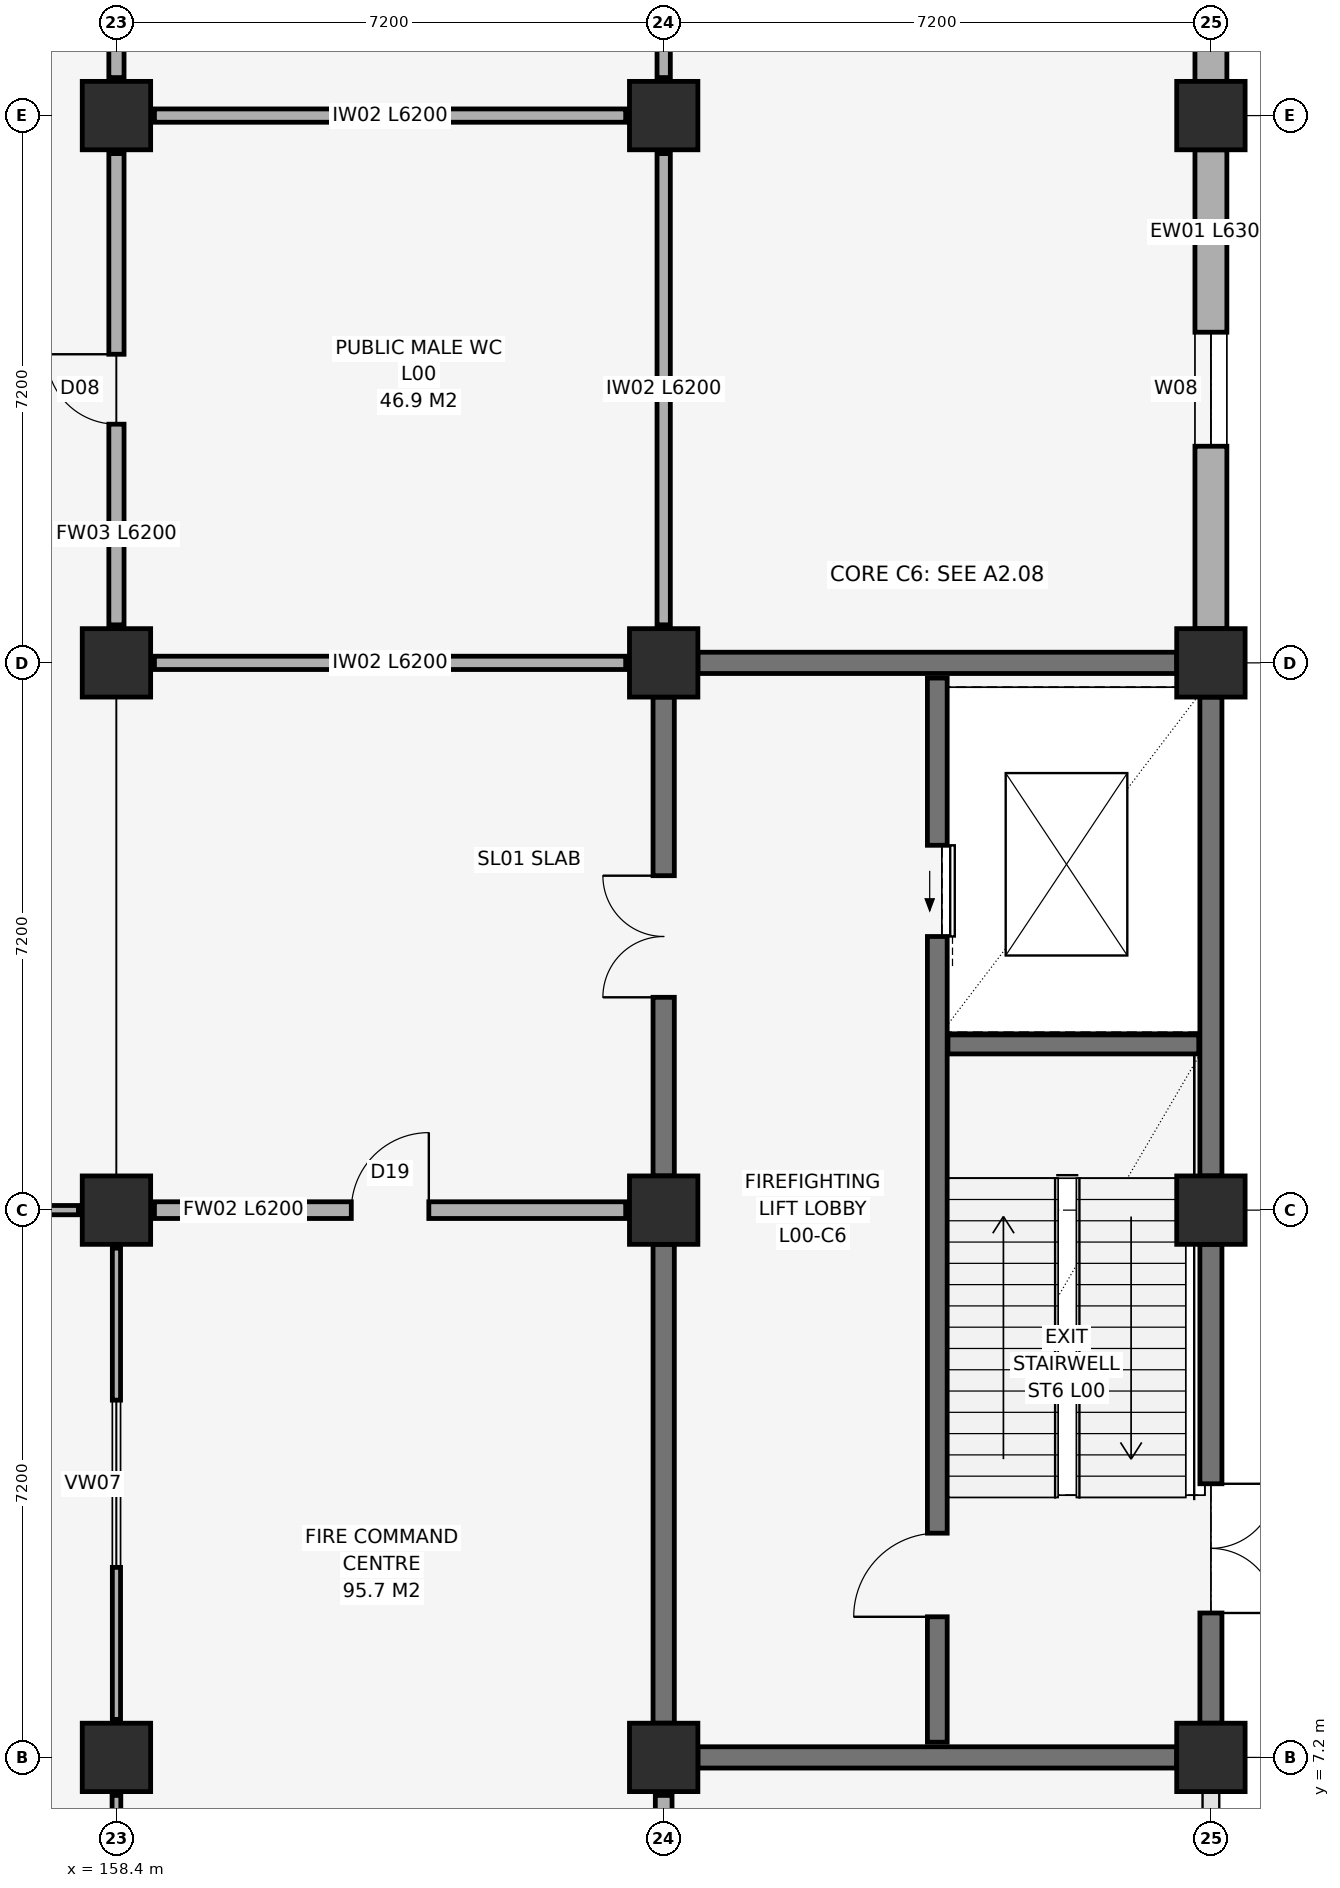
"""IFC4 building model, lengths in metres.
Left out: names, types, materials, properties, quantities, classifications, styles, units other than length and angle.
Written with IfcOpenShell. Run it as: python <this file> out.ifc"""

import sys

from ifc_helpers import new_model, si_unit, direction, frame, frame_2d, origin, origin_2d, place, context, subcontext, project, spatial, rectangle, extrude, element, fill, save


model = new_model("IFC4")
c1 = context("Model", 3, precision=1e-05, world=origin(), true_north=direction((0.0, 1.0)))
c2 = subcontext(c1, "Body", "Model", "MODEL_VIEW")
j1 = project(units=[si_unit("LENGTHUNIT", "METRE"), si_unit("PLANEANGLEUNIT", "RADIAN")], contexts=[c1])
p1 = place(None, origin())
s1 = spatial("IfcSite", under=j1, at=p1, CompositionType="ELEMENT")
p2 = place(p1, origin())
s2 = spatial("IfcBuilding", under=s1, at=p2, CompositionType="ELEMENT")
p3 = place(p2, origin())
s3 = spatial("IfcBuildingStorey", under=s2, at=p3, CompositionType="ELEMENT", Elevation=0.0)
for number, where, z_axis, x_axis in (
    (1, (158.4, 7.2, 0.0), (0.0, 0.0, 1.0), (1.0, 0.0, 0.0)),
    (2, (158.4, 14.4, 0.0), (0.0, 0.0, 1.0), (1.0, 0.0, 0.0)),
    (3, (158.4, 21.6, 0.0), (0.0, 0.0, 1.0), (1.0, 0.0, 0.0)),
    (4, (158.4, 28.8, 0.0), (0.0, 0.0, 1.0), (1.0, 0.0, 0.0)),
    (5, (165.6, 7.2, 0.0), (0.0, 0.0, 1.0), (1.0, 0.0, 0.0)),
    (6, (165.6, 14.4, 0.0), (0.0, 0.0, 1.0), (1.0, 0.0, 0.0)),
    (7, (165.6, 21.6, 0.0), (0.0, 0.0, 1.0), (1.0, 0.0, 0.0)),
    (8, (165.6, 28.8, 0.0), (0.0, 0.0, 1.0), (1.0, 0.0, 0.0)),
    (9, (172.8, 7.2, 0.0), (0.0, 0.0, 1.0), (1.0, 0.0, 0.0)),
    (10, (172.8, 14.4, 0.0), (0.0, 0.0, 1.0), (1.0, 0.0, 0.0)),
    (11, (172.8, 21.6, 0.0), (0.0, 0.0, 1.0), (1.0, 0.0, 0.0)),
    (12, (172.8, 28.8, 0.0), (0.0, 0.0, 1.0), (1.0, 0.0, 0.0)),
):
    element("IfcColumn", number, at=place(p3, frame(where, z_axis=z_axis, x_axis=x_axis)), inside=s3, PredefinedType="COLUMN", context=c2, shape_type="SweptSolid", body=[
        extrude(rectangle(XDim=0.9, YDim=0.9, at=origin_2d()), origin(), (0.0, 0.0, 1.0), 5.4),
    ])
p4 = place(p3, frame((172.8, 22.05, 0.0), z_axis=(0.0, 0.0, 1.0), x_axis=(0.0, 1.0, 0.0)))
e13 = element("IfcWall", 13, at=p4, inside=s3, PredefinedType="SOLIDWALL", context=c2, shape_type="SweptSolid", body=[
    extrude(rectangle(XDim=6.3, YDim=0.42, at=frame_2d((3.15, 0.0))), origin(), (0.0, 0.0, 1.0), 4.44),
])
p5 = place(p4, frame((2.4, 0.0, 0.95)))
e14 = element("IfcOpeningElement", 14, at=p5, cuts=e13, PredefinedType="OPENING", context=c2, shape_type="SweptSolid", body=[
    extrude(rectangle(XDim=1.5, YDim=2.0, at=frame_2d((0.75, 1.0))), frame((0.0, 0.225, 0.0), z_axis=(0.0, -1.0, 0.0), x_axis=(1.0, 0.0, 0.0)), (0.0, 0.0, 1.0), 0.45),
])
p6 = place(p3, frame((172.8, 29.25, 0.0), z_axis=(0.0, 0.0, 1.0), x_axis=(0.0, 1.0, 0.0)))
e15 = element("IfcWall", 15, at=p6, inside=s3, PredefinedType="SOLIDWALL", context=c2, shape_type="SweptSolid", body=[
    extrude(rectangle(XDim=6.3, YDim=0.42, at=frame_2d((3.15, 0.0))), origin(), (0.0, 0.0, 1.0), 4.44),
])
p7 = place(p6, frame((2.4, 0.0, 0.95)))
e16 = element("IfcOpeningElement", 16, at=p7, cuts=e15, PredefinedType="OPENING", context=c2, shape_type="SweptSolid", body=[
    extrude(rectangle(XDim=1.5, YDim=1.75, at=frame_2d((0.75, 0.875))), frame((0.0, 0.225, 0.0), z_axis=(0.0, -1.0, 0.0), x_axis=(1.0, 0.0, 0.0)), (0.0, 0.0, 1.0), 0.45),
])
for number, where, z_axis, x_axis in (
    (17, (166.05, 7.2, 0.0), (0.0, 0.0, 1.0), (1.0, 0.0, 0.0)),
    (18, (166.05, 21.6, 0.0), (0.0, 0.0, 1.0), (1.0, 0.0, 0.0)),
    (19, (165.6, 7.65, 0.0), (0.0, 0.0, 1.0), (0.0, 1.0, 0.0)),
):
    element("IfcWall", number, at=place(p3, frame(where, z_axis=z_axis, x_axis=x_axis)), inside=s3, PredefinedType="SHEAR", context=c2, shape_type="SweptSolid", body=[
        extrude(rectangle(XDim=6.3, YDim=0.28, at=frame_2d((3.15, 0.0))), origin(), (0.0, 0.0, 1.0), 5.14),
    ])
p8 = place(p3, frame((165.6, 14.85, 0.0), z_axis=(0.0, 0.0, 1.0), x_axis=(0.0, 1.0, 0.0)))
e20 = element("IfcWall", 20, at=p8, inside=s3, PredefinedType="SHEAR", context=c2, shape_type="SweptSolid", body=[
    extrude(rectangle(XDim=6.3, YDim=0.28, at=frame_2d((3.15, 0.0))), origin(), (0.0, 0.0, 1.0), 5.14),
])
p9 = place(p8, frame((2.35, 0.0, 0.0)))
e21 = element("IfcOpeningElement", 21, at=p9, cuts=e20, PredefinedType="OPENING", context=c2, shape_type="SweptSolid", body=[
    extrude(rectangle(XDim=1.6, YDim=2.2, at=frame_2d((0.8, 1.1))), frame((0.0, 0.155, 0.0), z_axis=(0.0, -1.0, 0.0), x_axis=(1.0, 0.0, 0.0)), (0.0, 0.0, 1.0), 0.31),
])
p10 = place(p3, frame((172.8, 7.65, 0.0), z_axis=(0.0, 0.0, 1.0), x_axis=(0.0, 1.0, 0.0)))
e22 = element("IfcWall", 22, at=p10, inside=s3, PredefinedType="SHEAR", context=c2, shape_type="SweptSolid", body=[
    extrude(rectangle(XDim=6.3, YDim=0.29, at=frame_2d((3.15, 0.0))), origin(), (0.0, 0.0, 1.0), 5.14),
])
p11 = place(p10, frame((1.45, 0.0, 0.0)))
e23 = element("IfcOpeningElement", 23, at=p11, cuts=e22, PredefinedType="OPENING", context=c2, shape_type="SweptSolid", body=[
    extrude(rectangle(XDim=1.7, YDim=2.3, at=frame_2d((0.85, 1.15))), frame((0.0, 0.16, 0.0), z_axis=(0.0, -1.0, 0.0), x_axis=(1.0, 0.0, 0.0)), (0.0, 0.0, 1.0), 0.32),
])
p12 = place(p3, frame((172.8, 14.85, 0.0), z_axis=(0.0, 0.0, 1.0), x_axis=(0.0, 1.0, 0.0)))
e24 = element("IfcWall", 24, at=p12, inside=s3, PredefinedType="SHEAR", context=c2, shape_type="SweptSolid", body=[
    extrude(rectangle(XDim=6.3, YDim=0.29, at=frame_2d((3.15, 0.0))), origin(), (0.0, 0.0, 1.0), 5.14),
])
p13 = place(p3, frame((169.2, 7.4, 0.0), z_axis=(0.0, 0.0, 1.0), x_axis=(0.0, 1.0, 0.0)))
e25 = element("IfcWall", 25, at=p13, inside=s3, PredefinedType="SHEAR", context=c2, shape_type="SweptSolid", body=[
    extrude(rectangle(XDim=14.0, YDim=0.26, at=frame_2d((7.0, 0.0))), origin(), (0.0, 0.0, 1.0), 5.14),
])
p14 = place(p13, frame((1.65, 0.0, 0.0)))
e26 = element("IfcOpeningElement", 26, at=p14, cuts=e25, PredefinedType="OPENING", context=c2, shape_type="SweptSolid", body=[
    extrude(rectangle(XDim=1.1, YDim=2.15, at=frame_2d((0.55, 1.075))), frame((0.0, 0.145, 0.0), z_axis=(0.0, -1.0, 0.0), x_axis=(1.0, 0.0, 0.0)), (0.0, 0.0, 1.0), 0.29),
])
p15 = place(p13, frame((10.6, 0.0, 0.0)))
e27 = element("IfcOpeningElement", 27, at=p15, cuts=e25, PredefinedType="OPENING", context=c2, shape_type="SweptSolid", body=[
    extrude(rectangle(XDim=1.2, YDim=2.25, at=frame_2d((0.6, 1.125))), frame((0.0, 0.145, 0.0), z_axis=(0.0, -1.0, 0.0), x_axis=(1.0, 0.0, 0.0)), (0.0, 0.0, 1.0), 0.29),
])
p16 = place(p3, frame((169.34, 16.58, 0.0), z_axis=(0.0, 0.0, 1.0), x_axis=(1.0, 0.0, 0.0)))
e28 = element("IfcWall", 28, at=p16, inside=s3, PredefinedType="SHEAR", context=c2, shape_type="SweptSolid", body=[
    extrude(rectangle(XDim=3.3, YDim=0.25, at=frame_2d((1.65, 0.0))), origin(), (0.0, 0.0, 1.0), 5.14),
])
p17 = place(p3, frame((151.7, 14.4, 0.0), z_axis=(0.0, 0.0, 1.0), x_axis=(1.0, 0.0, 0.0)))
e29 = element("IfcWall", 29, at=p17, inside=s3, PredefinedType="PARTITIONING", context=c2, shape_type="SweptSolid", body=[
    extrude(rectangle(XDim=6.2, YDim=0.122, at=frame_2d((3.1, 0.0))), origin(), (0.0, 0.0, 1.0), 4.29),
])
p18 = place(p17, frame((1.85, 0.0, 0.95)))
e30 = element("IfcOpeningElement", 30, at=p18, cuts=e29, PredefinedType="OPENING", context=c2, shape_type="SweptSolid", body=[
    extrude(rectangle(XDim=2.5, YDim=1.35, at=frame_2d((1.25, 0.675))), frame((0.0, 0.076, 0.0), z_axis=(0.0, -1.0, 0.0), x_axis=(1.0, 0.0, 0.0)), (0.0, 0.0, 1.0), 0.152),
])
p19 = place(p3, frame((158.4, 0.5, 0.0), z_axis=(0.0, 0.0, 1.0), x_axis=(0.0, 1.0, 0.0)))
e31 = element("IfcWall", 31, at=p19, inside=s3, PredefinedType="PARTITIONING", context=c2, shape_type="SweptSolid", body=[
    extrude(rectangle(XDim=6.2, YDim=0.115, at=frame_2d((3.1, 0.0))), origin(), (0.0, 0.0, 1.0), 4.49),
])
p20 = place(p3, frame((158.4, 7.7, 0.0), z_axis=(0.0, 0.0, 1.0), x_axis=(0.0, 1.0, 0.0)))
e32 = element("IfcWall", 32, at=p20, inside=s3, PredefinedType="PARTITIONING", context=c2, shape_type="SweptSolid", body=[
    extrude(rectangle(XDim=6.2, YDim=0.108, at=frame_2d((3.1, 0.0))), origin(), (0.0, 0.0, 1.0), 4.49),
])
p21 = place(p20, frame((2.0, 0.0, 0.95)))
e33 = element("IfcOpeningElement", 33, at=p21, cuts=e32, PredefinedType="OPENING", context=c2, shape_type="SweptSolid", body=[
    extrude(rectangle(XDim=2.2, YDim=1.35, at=frame_2d((1.1, 0.675))), frame((0.0, 0.069, 0.0), z_axis=(0.0, -1.0, 0.0), x_axis=(1.0, 0.0, 0.0)), (0.0, 0.0, 1.0), 0.138),
])
p22 = place(p3, frame((158.9, 14.4, 0.0), z_axis=(0.0, 0.0, 1.0), x_axis=(1.0, 0.0, 0.0)))
e34 = element("IfcWall", 34, at=p22, inside=s3, PredefinedType="SOLIDWALL", context=c2, shape_type="SweptSolid", body=[
    extrude(rectangle(XDim=6.2, YDim=0.22, at=frame_2d((3.1, 0.0))), origin(), (0.0, 0.0, 1.0), 4.29),
])
p23 = place(p22, frame((2.59, 0.0, 0.0)))
e35 = element("IfcOpeningElement", 35, at=p23, cuts=e34, PredefinedType="OPENING", context=c2, shape_type="SweptSolid", body=[
    extrude(rectangle(XDim=1.02, YDim=2.15, at=frame_2d((0.51, 1.075))), frame((0.0, 0.125, 0.0), z_axis=(0.0, -1.0, 0.0), x_axis=(1.0, 0.0, 0.0)), (0.0, 0.0, 1.0), 0.25),
])
p24 = place(p3, frame((165.6, 0.5, 0.0), z_axis=(0.0, 0.0, 1.0), x_axis=(0.0, 1.0, 0.0)))
e36 = element("IfcWall", 36, at=p24, inside=s3, PredefinedType="SOLIDWALL", context=c2, shape_type="SweptSolid", body=[
    extrude(rectangle(XDim=6.2, YDim=0.22, at=frame_2d((3.1, 0.0))), origin(), (0.0, 0.0, 1.0), 4.49),
])
for number, where, z_axis, x_axis in (
    (37, (158.9, 21.6, 0.0), (0.0, 0.0, 1.0), (1.0, 0.0, 0.0)),
    (38, (158.9, 28.8, 0.0), (0.0, 0.0, 1.0), (1.0, 0.0, 0.0)),
):
    element("IfcWall", number, at=place(p3, frame(where, z_axis=z_axis, x_axis=x_axis)), inside=s3, PredefinedType="PARTITIONING", context=c2, shape_type="SweptSolid", body=[
        extrude(rectangle(XDim=6.2, YDim=0.175, at=frame_2d((3.1, 0.0))), origin(), (0.0, 0.0, 1.0), 4.29),
    ])
p25 = place(p3, frame((158.4, 22.1, 0.0), z_axis=(0.0, 0.0, 1.0), x_axis=(0.0, 1.0, 0.0)))
e39 = element("IfcWall", 39, at=p25, inside=s3, PredefinedType="SOLIDWALL", context=c2, shape_type="SweptSolid", body=[
    extrude(rectangle(XDim=6.2, YDim=0.2, at=frame_2d((3.1, 0.0))), origin(), (0.0, 0.0, 1.0), 4.49),
])
p26 = place(p25, frame((2.64, 0.0, 0.0)))
e40 = element("IfcOpeningElement", 40, at=p26, cuts=e39, PredefinedType="OPENING", context=c2, shape_type="SweptSolid", body=[
    extrude(rectangle(XDim=0.92, YDim=2.1, at=frame_2d((0.46, 1.05))), frame((0.0, 0.115, 0.0), z_axis=(0.0, -1.0, 0.0), x_axis=(1.0, 0.0, 0.0)), (0.0, 0.0, 1.0), 0.23),
])
p27 = place(p3, frame((165.6, 22.1, 0.0), z_axis=(0.0, 0.0, 1.0), x_axis=(0.0, 1.0, 0.0)))
e41 = element("IfcWall", 41, at=p27, inside=s3, PredefinedType="PARTITIONING", context=c2, shape_type="SweptSolid", body=[
    extrude(rectangle(XDim=6.2, YDim=0.175, at=frame_2d((3.1, 0.0))), origin(), (0.0, 0.0, 1.0), 4.49),
])
p28 = place(p3, frame((158.4, 29.3, 0.0), z_axis=(0.0, 0.0, 1.0), x_axis=(0.0, 1.0, 0.0)))
e42 = element("IfcWall", 42, at=p28, inside=s3, PredefinedType="SOLIDWALL", context=c2, shape_type="SweptSolid", body=[
    extrude(rectangle(XDim=6.2, YDim=0.2, at=frame_2d((3.1, 0.0))), origin(), (0.0, 0.0, 1.0), 4.49),
])
p29 = place(p28, frame((2.625, 0.0, 0.0)))
e43 = element("IfcOpeningElement", 43, at=p29, cuts=e42, PredefinedType="OPENING", context=c2, shape_type="SweptSolid", body=[
    extrude(rectangle(XDim=0.95, YDim=2.1, at=frame_2d((0.475, 1.05))), frame((0.0, 0.115, 0.0), z_axis=(0.0, -1.0, 0.0), x_axis=(1.0, 0.0, 0.0)), (0.0, 0.0, 1.0), 0.23),
])
p30 = place(p3, frame((165.6, 29.3, 0.0), z_axis=(0.0, 0.0, 1.0), x_axis=(0.0, 1.0, 0.0)))
e44 = element("IfcWall", 44, at=p30, inside=s3, PredefinedType="PARTITIONING", context=c2, shape_type="SweptSolid", body=[
    extrude(rectangle(XDim=6.2, YDim=0.175, at=frame_2d((3.1, 0.0))), origin(), (0.0, 0.0, 1.0), 4.49),
])
p31 = place(p5, origin())
e45 = element("IfcWindow", 45, at=p31, inside=s3, PartitioningType="SINGLE_PANEL", PredefinedType="WINDOW", context=c2, shape_type="SweptSolid", body=[
    extrude(rectangle(XDim=1.5, YDim=2.0, at=frame_2d((0.75, 1.0))), frame((0.0, 0.03, 0.0), z_axis=(0.0, -1.0, 0.0), x_axis=(1.0, 0.0, 0.0)), (0.0, 0.0, 1.0), 0.06),
])
fill(e14, e45)
p32 = place(p14, frame((1.1, 0.0, 0.0), z_axis=(0.0, 0.0, 1.0), x_axis=(-1.0, 0.0, 0.0)))
e46 = element("IfcDoor", 46, at=p32, inside=s3, OperationType="SINGLE_SWING_RIGHT", PredefinedType="DOOR", context=c2, shape_type="SweptSolid", body=[
    extrude(rectangle(XDim=1.1, YDim=2.15, at=frame_2d((0.55, 1.075))), frame((0.0, 0.025, 0.0), z_axis=(0.0, -1.0, 0.0), x_axis=(1.0, 0.0, 0.0)), (0.0, 0.0, 1.0), 0.05),
])
fill(e26, e46)
p33 = place(p15, origin())
e47 = element("IfcDoor", 47, at=p33, inside=s3, OperationType="SLIDING_TO_LEFT", PredefinedType="DOOR", context=c2, shape_type="SweptSolid", body=[
    extrude(rectangle(XDim=1.2, YDim=2.25, at=frame_2d((0.6, 1.125))), frame((0.0, 0.025, 0.0), z_axis=(0.0, -1.0, 0.0), x_axis=(1.0, 0.0, 0.0)), (0.0, 0.0, 1.0), 0.05),
])
fill(e27, e47)
p34 = place(p9, origin())
e48 = element("IfcDoor", 48, at=p34, inside=s3, OperationType="DOUBLE_SWING_LEFT", PredefinedType="DOOR", context=c2, shape_type="SweptSolid", body=[
    extrude(rectangle(XDim=1.6, YDim=2.2, at=frame_2d((0.8, 1.1))), frame((0.0, 0.025, 0.0), z_axis=(0.0, -1.0, 0.0), x_axis=(1.0, 0.0, 0.0)), (0.0, 0.0, 1.0), 0.05),
])
fill(e21, e48)
p35 = place(p11, frame((1.7, 0.0, 0.0), z_axis=(0.0, 0.0, 1.0), x_axis=(-1.0, 0.0, 0.0)))
e49 = element("IfcDoor", 49, at=p35, inside=s3, OperationType="DOUBLE_SWING_LEFT", PredefinedType="DOOR", context=c2, shape_type="SweptSolid", body=[
    extrude(rectangle(XDim=1.7, YDim=2.3, at=frame_2d((0.85, 1.15))), frame((0.0, 0.025, 0.0), z_axis=(0.0, -1.0, 0.0), x_axis=(1.0, 0.0, 0.0)), (0.0, 0.0, 1.0), 0.05),
])
fill(e23, e49)
p36 = place(p21, origin())
e50 = element("IfcWindow", 50, at=p36, inside=s3, PartitioningType="SINGLE_PANEL", PredefinedType="WINDOW", context=c2, shape_type="SweptSolid", body=[
    extrude(rectangle(XDim=2.2, YDim=1.35, at=frame_2d((1.1, 0.675))), frame((0.0, 0.03, 0.0), z_axis=(0.0, -1.0, 0.0), x_axis=(1.0, 0.0, 0.0)), (0.0, 0.0, 1.0), 0.06),
])
fill(e33, e50)
p37 = place(p23, frame((1.02, 0.0, 0.0), z_axis=(0.0, 0.0, 1.0), x_axis=(-1.0, 0.0, 0.0)))
e51 = element("IfcDoor", 51, at=p37, inside=s3, OperationType="SINGLE_SWING_LEFT", PredefinedType="DOOR", context=c2, shape_type="SweptSolid", body=[
    extrude(rectangle(XDim=1.02, YDim=2.15, at=frame_2d((0.51, 1.075))), frame((0.0, 0.025, 0.0), z_axis=(0.0, -1.0, 0.0), x_axis=(1.0, 0.0, 0.0)), (0.0, 0.0, 1.0), 0.05),
])
fill(e35, e51)
p38 = place(p26, frame((0.92, 0.0, 0.0), z_axis=(0.0, 0.0, 1.0), x_axis=(-1.0, 0.0, 0.0)))
e52 = element("IfcDoor", 52, at=p38, inside=s3, OperationType="SINGLE_SWING_LEFT", PredefinedType="DOOR", context=c2, shape_type="SweptSolid", body=[
    extrude(rectangle(XDim=0.92, YDim=2.1, at=frame_2d((0.46, 1.05))), frame((0.0, 0.025, 0.0), z_axis=(0.0, -1.0, 0.0), x_axis=(1.0, 0.0, 0.0)), (0.0, 0.0, 1.0), 0.05),
])
fill(e40, e52)
save(model, sys.argv[1])
